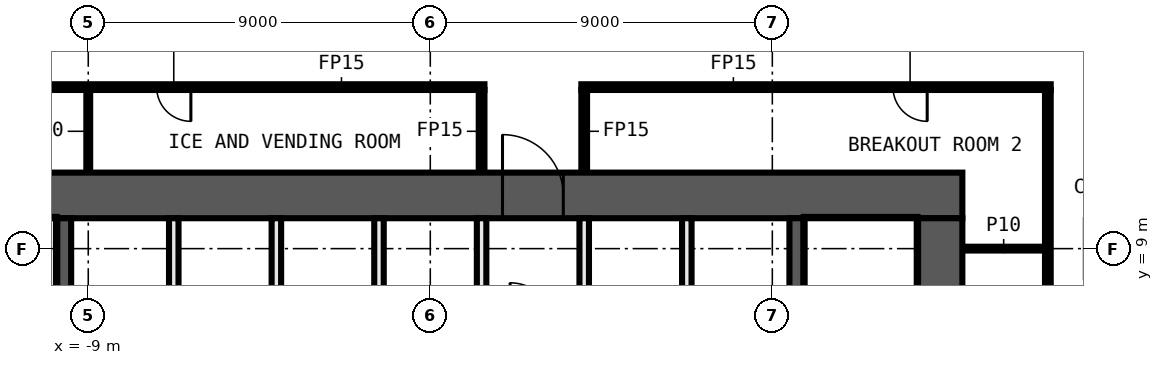
"""IFC4 building model, lengths in metres.
Left out: names, types, materials, properties, quantities, classifications, styles, units other than length and angle.
Written with IfcOpenShell. Run it as: python <this file> out.ifc"""

import sys

from ifc_helpers import new_model, si_unit, direction, frame, frame_2d, origin, place, context, subcontext, project, spatial, rectangle, extrude, element, fill, save


model = new_model("IFC4")
c1 = context("Model", 3, precision=1e-05, world=origin(), true_north=direction((0.0, 1.0)))
c2 = subcontext(c1, "Body", "Model", "MODEL_VIEW")
j1 = project(units=[si_unit("LENGTHUNIT", "METRE"), si_unit("PLANEANGLEUNIT", "RADIAN")], contexts=[c1])
p1 = place(None, origin())
s1 = spatial("IfcSite", under=j1, at=p1, CompositionType="ELEMENT")
p2 = place(p1, origin())
s2 = spatial("IfcBuilding", under=s1, at=p2, CompositionType="ELEMENT")
p3 = place(p2, frame((0.0, 0.0, 81.0)))
s3 = spatial("IfcBuildingStorey", under=s2, at=p3, CompositionType="ELEMENT", Elevation=81.0)
p4 = place(p3, frame((14.0, 9.0, 0.0), z_axis=(0.0, 0.0, 1.0), x_axis=(1.0, 0.0, 0.0)))
e1 = element("IfcWall", 1, at=p4, inside=s3, PredefinedType="PARTITIONING", context=c2, shape_type="SweptSolid", body=[
    extrude(rectangle(XDim=2.175, YDim=0.1, at=frame_2d((1.087, 0.0))), origin(), (0.0, 0.0, 1.0), 3.3),
])
p5 = place(p3, frame((1.425, 13.25, 0.0), z_axis=(0.0, 0.0, 1.0), x_axis=(-1.0, 0.0, 0.0)))
e2 = element("IfcWall", 2, at=p5, inside=s3, PredefinedType="PARTITIONING", context=c2, shape_type="SweptSolid", body=[
    extrude(rectangle(XDim=17.75, YDim=0.15, at=frame_2d((8.875, 0.0))), origin(), (0.0, 0.0, 1.0), 3.3),
])
p6 = place(p5, frame((7.725, 0.0, 0.0)))
e3 = element("IfcOpeningElement", 3, at=p6, cuts=e2, PredefinedType="OPENING", context=c2, shape_type="SweptSolid", body=[
    extrude(rectangle(XDim=0.9, YDim=2.1, at=frame_2d((0.45, 1.05))), frame((0.0, 0.085, 0.0), z_axis=(0.0, -1.0, 0.0), x_axis=(1.0, 0.0, 0.0)), (0.0, 0.0, 1.0), 0.17),
])
p7 = place(p5, frame((13.6, 0.0, 0.0)))
e4 = element("IfcOpeningElement", 4, at=p7, cuts=e2, PredefinedType="OPENING", context=c2, shape_type="SweptSolid", body=[
    extrude(rectangle(XDim=0.9, YDim=2.1, at=frame_2d((0.45, 1.05))), frame((0.0, 0.085, 0.0), z_axis=(0.0, -1.0, 0.0), x_axis=(1.0, 0.0, 0.0)), (0.0, 0.0, 1.0), 0.17),
])
p8 = place(p3, frame((16.325, 13.25, 0.0), z_axis=(0.0, 0.0, 1.0), x_axis=(-1.0, 0.0, 0.0)))
e5 = element("IfcWall", 5, at=p8, inside=s3, PredefinedType="PARTITIONING", context=c2, shape_type="SweptSolid", body=[
    extrude(rectangle(XDim=12.35, YDim=0.15, at=frame_2d((6.175, 0.0))), origin(), (0.0, 0.0, 1.0), 3.3),
])
p9 = place(p8, frame((3.25, 0.0, 0.0)))
e6 = element("IfcOpeningElement", 6, at=p9, cuts=e5, PredefinedType="OPENING", context=c2, shape_type="SweptSolid", body=[
    extrude(rectangle(XDim=0.9, YDim=2.1, at=frame_2d((0.45, 1.05))), frame((0.0, 0.085, 0.0), z_axis=(0.0, -1.0, 0.0), x_axis=(1.0, 0.0, 0.0)), (0.0, 0.0, 1.0), 0.17),
])
p10 = place(p3, frame((16.25, -13.175, 0.0), z_axis=(0.0, 0.0, 1.0), x_axis=(0.0, 1.0, 0.0)))
e7 = element("IfcWall", 7, at=p10, inside=s3, PredefinedType="PARTITIONING", context=c2, shape_type="SweptSolid", body=[
    extrude(rectangle(XDim=26.35, YDim=0.15, at=frame_2d((13.175, 0.0))), origin(), (0.0, 0.0, 1.0), 3.3),
])
p11 = place(p10, frame((17.225, 0.0, 0.0)))
e8 = element("IfcOpeningElement", 8, at=p11, cuts=e7, PredefinedType="OPENING", context=c2, shape_type="SweptSolid", body=[
    extrude(rectangle(XDim=0.9, YDim=2.1, at=frame_2d((0.45, 1.05))), frame((0.0, 0.085, 0.0), z_axis=(0.0, -1.0, 0.0), x_axis=(1.0, 0.0, 0.0)), (0.0, 0.0, 1.0), 0.17),
])
for number, where, z_axis, x_axis in (
    (9, (4.05, 11.0, 0.0), (0.0, 0.0, 1.0), (0.0, 1.0, 0.0)),
    (10, (1.35, 11.0, 0.0), (0.0, 0.0, 1.0), (0.0, 1.0, 0.0)),
):
    element("IfcWall", number, at=place(p3, frame(where, z_axis=z_axis, x_axis=x_axis)), inside=s3, PredefinedType="PARTITIONING", context=c2, shape_type="SweptSolid", body=[
        extrude(rectangle(XDim=2.175, YDim=0.15, at=frame_2d((1.087, 0.0))), origin(), (0.0, 0.0, 1.0), 3.3),
    ])
p12 = place(p3, frame((-9.0, 11.0, 0.0), z_axis=(0.0, 0.0, 1.0), x_axis=(0.0, 1.0, 0.0)))
e11 = element("IfcWall", 11, at=p12, inside=s3, PredefinedType="PARTITIONING", context=c2, shape_type="SweptSolid", body=[
    extrude(rectangle(XDim=2.175, YDim=0.1, at=frame_2d((1.087, 0.0))), origin(), (0.0, 0.0, 1.0), 3.3),
])
p13 = place(p3, frame((-14.0, 10.4, 0.0), z_axis=(0.0, 0.0, 1.0), x_axis=(1.0, 0.0, 0.0)))
e12 = element("IfcWall", 12, at=p13, inside=s3, PredefinedType="SHEAR", context=c2, shape_type="SweptSolid", body=[
    extrude(rectangle(XDim=28.0, YDim=1.2, at=frame_2d((14.0, 0.0))), origin(), (0.0, 0.0, 1.0), 3.3),
])
p14 = place(p13, frame((15.9, 0.0, 0.0)))
e13 = element("IfcOpeningElement", 13, at=p14, cuts=e12, PredefinedType="OPENING", context=c2, shape_type="SweptSolid", body=[
    extrude(rectangle(XDim=1.6, YDim=2.1, at=frame_2d((0.8, 1.05))), frame((0.0, 0.61, 0.0), z_axis=(0.0, -1.0, 0.0), x_axis=(1.0, 0.0, 0.0)), (0.0, 0.0, 1.0), 1.22),
])
p15 = place(p3, frame((13.4, 9.8, 0.0), z_axis=(0.0, 0.0, 1.0), x_axis=(0.0, -1.0, 0.0)))
e14 = element("IfcWall", 14, at=p15, inside=s3, PredefinedType="SHEAR", context=c2, shape_type="SweptSolid", body=[
    extrude(rectangle(XDim=19.6, YDim=1.2, at=frame_2d((9.8, 0.0))), origin(), (0.0, 0.0, 1.0), 3.3),
])
p16 = place(p3, frame((9.65, 9.8, 0.0), z_axis=(0.0, 0.0, 1.0), x_axis=(0.0, -1.0, 0.0)))
e15 = element("IfcWall", 15, at=p16, inside=s3, PredefinedType="SHEAR", context=c2, shape_type="SweptSolid", body=[
    extrude(rectangle(XDim=7.5, YDim=0.4, at=frame_2d((3.75, 0.0))), origin(), (0.0, 0.0, 1.0), 3.3),
])
p17 = place(p16, frame((5.1, 0.0, 0.0)))
e16 = element("IfcOpeningElement", 16, at=p17, cuts=e15, PredefinedType="OPENING", context=c2, shape_type="SweptSolid", body=[
    extrude(rectangle(XDim=1.2, YDim=2.1, at=frame_2d((0.6, 1.05))), frame((0.0, 0.21, 0.0), z_axis=(0.0, -1.0, 0.0), x_axis=(1.0, 0.0, 0.0)), (0.0, 0.0, 1.0), 0.42),
])
p18 = place(p3, frame((-9.65, 2.3, 0.0), z_axis=(0.0, 0.0, 1.0), x_axis=(0.0, 1.0, 0.0)))
e17 = element("IfcWall", 17, at=p18, inside=s3, PredefinedType="SHEAR", context=c2, shape_type="SweptSolid", body=[
    extrude(rectangle(XDim=7.5, YDim=0.4, at=frame_2d((3.75, 0.0))), origin(), (0.0, 0.0, 1.0), 3.3),
])
p19 = place(p18, frame((1.2, 0.0, 0.0)))
e18 = element("IfcOpeningElement", 18, at=p19, cuts=e17, PredefinedType="OPENING", context=c2, shape_type="SweptSolid", body=[
    extrude(rectangle(XDim=1.2, YDim=2.1, at=frame_2d((0.6, 1.05))), frame((0.0, 0.21, 0.0), z_axis=(0.0, -1.0, 0.0), x_axis=(1.0, 0.0, 0.0)), (0.0, 0.0, 1.0), 0.42),
])
for number, where, z_axis, x_axis in (
    (19, (6.75, 7.075, 0.0), (0.0, 0.0, 1.0), (0.0, 1.0, 0.0)),
    (20, (4.05, 7.075, 0.0), (0.0, 0.0, 1.0), (0.0, 1.0, 0.0)),
    (21, (1.35, 7.075, 0.0), (0.0, 0.0, 1.0), (0.0, 1.0, 0.0)),
    (22, (-1.35, 7.075, 0.0), (0.0, 0.0, 1.0), (0.0, 1.0, 0.0)),
    (23, (-4.05, 7.075, 0.0), (0.0, 0.0, 1.0), (0.0, 1.0, 0.0)),
    (24, (-6.75, 7.075, 0.0), (0.0, 0.0, 1.0), (0.0, 1.0, 0.0)),
):
    element("IfcWall", number, at=place(p3, frame(where, z_axis=z_axis, x_axis=x_axis)), inside=s3, PredefinedType="SOLIDWALL", context=c2, shape_type="SweptSolid", body=[
        extrude(rectangle(XDim=2.725, YDim=0.25, at=frame_2d((1.363, 0.0))), origin(), (0.0, 0.0, 1.0), 3.3),
    ])
p20 = place(p9, origin())
e25 = element("IfcDoor", 25, at=p20, inside=s3, OperationType="SINGLE_SWING_RIGHT", PredefinedType="DOOR", context=c2, shape_type="SweptSolid", body=[
    extrude(rectangle(XDim=0.9, YDim=2.1, at=frame_2d((0.45, 1.05))), frame((0.0, 0.025, 0.0), z_axis=(0.0, -1.0, 0.0), x_axis=(1.0, 0.0, 0.0)), (0.0, 0.0, 1.0), 0.05),
])
fill(e6, e25)
p21 = place(p6, origin())
e26 = element("IfcDoor", 26, at=p21, inside=s3, OperationType="SINGLE_SWING_LEFT", PredefinedType="DOOR", context=c2, shape_type="SweptSolid", body=[
    extrude(rectangle(XDim=0.9, YDim=2.1, at=frame_2d((0.45, 1.05))), frame((0.0, 0.025, 0.0), z_axis=(0.0, -1.0, 0.0), x_axis=(1.0, 0.0, 0.0)), (0.0, 0.0, 1.0), 0.05),
])
fill(e3, e26)
p22 = place(p14, origin())
e27 = element("IfcDoor", 27, at=p22, inside=s3, OperationType="DOUBLE_DOOR_SINGLE_SWING", PredefinedType="DOOR", context=c2, shape_type="SweptSolid", body=[
    extrude(rectangle(XDim=1.6, YDim=2.1, at=frame_2d((0.8, 1.05))), frame((0.0, 0.025, 0.0), z_axis=(0.0, -1.0, 0.0), x_axis=(1.0, 0.0, 0.0)), (0.0, 0.0, 1.0), 0.05),
])
fill(e13, e27)
save(model, sys.argv[1])
